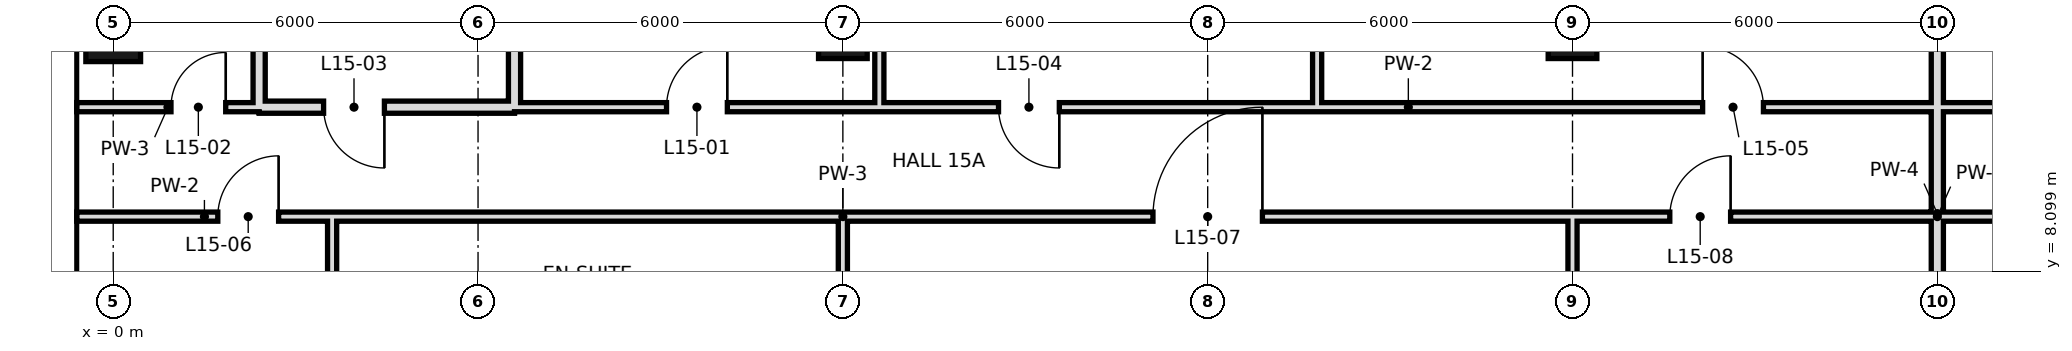
"""IFC4 building model, lengths in metres.
Left out: names, types, materials, properties, quantities, classifications, styles, units other than length and angle.
Written with IfcOpenShell. Run it as: python <this file> out.ifc"""

import sys

from ifc_helpers import new_model, si_unit, direction, frame, frame_2d, origin, origin_2d, place, context, subcontext, project, spatial, rectangle, hollow_rectangle, extrude, element, fill, save


model = new_model("IFC4")
c1 = context("Model", 3, precision=1e-05, world=origin(), true_north=direction((0.0, 1.0)))
c2 = subcontext(c1, "Body", "Model", "MODEL_VIEW")
j1 = project(units=[si_unit("LENGTHUNIT", "METRE"), si_unit("PLANEANGLEUNIT", "RADIAN")], contexts=[c1])
p1 = place(None, origin())
s1 = spatial("IfcSite", under=j1, at=p1, CompositionType="ELEMENT")
p2 = place(p1, origin())
s2 = spatial("IfcBuilding", under=s1, at=p2, CompositionType="ELEMENT")
p3 = place(p2, frame((0.0, 0.0, 75.0)))
s3 = spatial("IfcBuildingStorey", under=s2, at=p3, CompositionType="ELEMENT", Elevation=75.0)
p4 = place(p3, frame((0.0, 12.0, 0.0), z_axis=(0.0, 0.0, 1.0), x_axis=(1.0, 0.0, 0.0)))
e1 = element("IfcColumn", 1, at=p4, inside=s3, PredefinedType="COLUMN", context=c2, shape_type="SweptSolid", body=[
    extrude(hollow_rectangle(XDim=0.9, YDim=0.9, WallThickness=0.045, at=origin_2d()), origin(), (0.0, 0.0, 1.0), 3.6),
])
for number, where, z_axis, x_axis in (
    (2, (12.0, 12.0, 0.0), (0.0, 0.0, 1.0), (1.0, 0.0, 0.0)),
    (3, (24.0, 12.0, 0.0), (0.0, 0.0, 1.0), (1.0, 0.0, 0.0)),
):
    element("IfcColumn", number, at=place(p3, frame(where, z_axis=z_axis, x_axis=x_axis)), inside=s3, PredefinedType="COLUMN", context=c2, shape_type="SweptSolid", body=[
        extrude(hollow_rectangle(XDim=0.8, YDim=0.8, WallThickness=0.04, at=origin_2d()), origin(), (0.0, 0.0, 1.0), 3.6),
    ])
p5 = place(p3, frame((12.0, 6.0, 0.0), z_axis=(0.0, 0.0, 1.0), x_axis=(0.0, 1.0, 0.0)))
e4 = element("IfcWall", 4, at=p5, inside=s3, PredefinedType="PARTITIONING", context=c2, shape_type="SweptSolid", body=[
    extrude(rectangle(XDim=3.0, YDim=0.15, at=frame_2d((1.5, 0.0))), origin(), (0.0, 0.0, 1.0), 2.72),
])
for number, where, z_axis, x_axis in (
    (5, (12.6, 10.8, 0.0), (0.0, 0.0, 1.0), (0.0, 1.0, 0.0)),
    (6, (19.8, 10.8, 0.0), (0.0, 0.0, 1.0), (0.0, 1.0, 0.0)),
):
    element("IfcWall", number, at=place(p3, frame(where, z_axis=z_axis, x_axis=x_axis)), inside=s3, PredefinedType="PARTITIONING", context=c2, shape_type="SweptSolid", body=[
        extrude(rectangle(XDim=7.9, YDim=0.15, at=frame_2d((3.95, 0.0))), origin(), (0.0, 0.0, 1.0), 3.42),
    ])
p6 = place(p3, frame((2.4, 10.8, 0.0), z_axis=(0.0, 0.0, 1.0), x_axis=(0.0, 1.0, 0.0)))
e7 = element("IfcWall", 7, at=p6, inside=s3, PredefinedType="SOLIDWALL", context=c2, shape_type="SweptSolid", body=[
    extrude(rectangle(XDim=7.2, YDim=0.2, at=frame_2d((3.6, 0.0))), origin(), (0.0, 0.0, 1.0), 2.72),
])
p7 = place(p3, frame((24.0, 0.0, 0.0), z_axis=(0.0, 0.0, 1.0), x_axis=(0.0, 1.0, 0.0)))
e8 = element("IfcWall", 8, at=p7, inside=s3, PredefinedType="PARTITIONING", context=c2, shape_type="SweptSolid", body=[
    extrude(rectangle(XDim=9.0, YDim=0.15, at=frame_2d((4.5, 0.0))), origin(), (0.0, 0.0, 1.0), 2.72),
])
p8 = place(p3, frame((3.6, 6.0, 0.0), z_axis=(0.0, 0.0, 1.0), x_axis=(0.0, 1.0, 0.0)))
e9 = element("IfcWall", 9, at=p8, inside=s3, PredefinedType="PARTITIONING", context=c2, shape_type="SweptSolid", body=[
    extrude(rectangle(XDim=3.0, YDim=0.15, at=frame_2d((1.5, 0.0))), origin(), (0.0, 0.0, 1.0), 3.42),
])
p9 = place(p3, frame((30.0, -0.6, 0.0), z_axis=(0.0, 0.0, 1.0), x_axis=(0.0, 1.0, 0.0)))
e10 = element("IfcWall", 10, at=p9, inside=s3, PredefinedType="SOLIDWALL", context=c2, shape_type="SweptSolid", body=[
    extrude(rectangle(XDim=19.3, YDim=0.2, at=frame_2d((9.65, 0.0))), origin(), (0.0, 0.0, 1.0), 2.72),
])
p10 = place(p3, frame((6.6, 10.8, 0.0), z_axis=(0.0, 0.0, 1.0), x_axis=(0.0, 1.0, 0.0)))
e11 = element("IfcWall", 11, at=p10, inside=s3, PredefinedType="SOLIDWALL", context=c2, shape_type="SweptSolid", body=[
    extrude(rectangle(XDim=7.9, YDim=0.2, at=frame_2d((3.95, 0.0))), origin(), (0.0, 0.0, 1.0), 2.72),
])
p11 = place(p3, frame((2.4, 10.8, 0.0), z_axis=(0.0, 0.0, 1.0), x_axis=(1.0, 0.0, 0.0)))
e12 = element("IfcWall", 12, at=p11, inside=s3, PredefinedType="SOLIDWALL", context=c2, shape_type="SweptSolid", body=[
    extrude(rectangle(XDim=4.2, YDim=0.2, at=frame_2d((2.1, 0.0))), origin(), (0.0, 0.0, 1.0), 2.72),
])
p12 = place(p11, frame((1.06, 0.0, 0.0)))
e13 = element("IfcOpeningElement", 13, at=p12, cuts=e12, PredefinedType="OPENING", context=c2, shape_type="SweptSolid", body=[
    extrude(rectangle(XDim=1.0, YDim=2.4, at=frame_2d((0.5, 1.2))), frame((0.0, 0.11, 0.0), z_axis=(0.0, -1.0, 0.0), x_axis=(1.0, 0.0, 0.0)), (0.0, 0.0, 1.0), 0.22),
])
p13 = place(p3, frame((6.6, 10.8, 0.0), z_axis=(0.0, 0.0, 1.0), x_axis=(1.0, 0.0, 0.0)))
e14 = element("IfcWall", 14, at=p13, inside=s3, PredefinedType="PARTITIONING", context=c2, shape_type="SweptSolid", body=[
    extrude(rectangle(XDim=29.4, YDim=0.15, at=frame_2d((14.7, 0.0))), origin(), (0.0, 0.0, 1.0), 3.42),
])
p14 = place(p13, frame((2.5, 0.0, 0.0)))
e15 = element("IfcOpeningElement", 15, at=p14, cuts=e14, PredefinedType="OPENING", context=c2, shape_type="SweptSolid", body=[
    extrude(rectangle(XDim=1.0, YDim=2.4, at=frame_2d((0.5, 1.2))), frame((0.0, 0.085, 0.0), z_axis=(0.0, -1.0, 0.0), x_axis=(1.0, 0.0, 0.0)), (0.0, 0.0, 1.0), 0.17),
])
p15 = place(p13, frame((7.96, 0.0, 0.0)))
e16 = element("IfcOpeningElement", 16, at=p15, cuts=e14, PredefinedType="OPENING", context=c2, shape_type="SweptSolid", body=[
    extrude(rectangle(XDim=1.0, YDim=2.4, at=frame_2d((0.5, 1.2))), frame((0.0, 0.085, 0.0), z_axis=(0.0, -1.0, 0.0), x_axis=(1.0, 0.0, 0.0)), (0.0, 0.0, 1.0), 0.17),
])
p16 = place(p13, frame((19.54, 0.0, 0.0)))
e17 = element("IfcOpeningElement", 17, at=p16, cuts=e14, PredefinedType="OPENING", context=c2, shape_type="SweptSolid", body=[
    extrude(rectangle(XDim=1.0, YDim=2.4, at=frame_2d((0.5, 1.2))), frame((0.0, 0.085, 0.0), z_axis=(0.0, -1.0, 0.0), x_axis=(1.0, 0.0, 0.0)), (0.0, 0.0, 1.0), 0.17),
])
p17 = place(p13, frame((26.8, 0.0, 0.0)))
e18 = element("IfcOpeningElement", 18, at=p17, cuts=e14, PredefinedType="OPENING", context=c2, shape_type="SweptSolid", body=[
    extrude(rectangle(XDim=1.0, YDim=2.4, at=frame_2d((0.5, 1.2))), frame((0.0, 0.085, 0.0), z_axis=(0.0, -1.0, 0.0), x_axis=(1.0, 0.0, 0.0)), (0.0, 0.0, 1.0), 0.17),
])
p18 = place(p3, frame((-0.6, 10.8, 0.0), z_axis=(0.0, 0.0, 1.0), x_axis=(1.0, 0.0, 0.0)))
e19 = element("IfcWall", 19, at=p18, inside=s3, PredefinedType="PARTITIONING", context=c2, shape_type="SweptSolid", body=[
    extrude(rectangle(XDim=3.0, YDim=0.15, at=frame_2d((1.5, 0.0))), origin(), (0.0, 0.0, 1.0), 3.42),
])
p19 = place(p18, frame((1.55, 0.0, 0.0)))
e20 = element("IfcOpeningElement", 20, at=p19, cuts=e19, PredefinedType="OPENING", context=c2, shape_type="SweptSolid", body=[
    extrude(rectangle(XDim=0.9, YDim=2.4, at=frame_2d((0.45, 1.2))), frame((0.0, 0.085, 0.0), z_axis=(0.0, -1.0, 0.0), x_axis=(1.0, 0.0, 0.0)), (0.0, 0.0, 1.0), 0.17),
])
p20 = place(p3, frame((-0.6, 9.0, 0.0), z_axis=(0.0, 0.0, 1.0), x_axis=(1.0, 0.0, 0.0)))
e21 = element("IfcWall", 21, at=p20, inside=s3, PredefinedType="PARTITIONING", context=c2, shape_type="SweptSolid", body=[
    extrude(rectangle(XDim=4.2, YDim=0.15, at=frame_2d((2.1, 0.0))), origin(), (0.0, 0.0, 1.0), 3.42),
])
p21 = place(p20, frame((2.32, 0.0, 0.0)))
e22 = element("IfcOpeningElement", 22, at=p21, cuts=e21, PredefinedType="OPENING", context=c2, shape_type="SweptSolid", body=[
    extrude(rectangle(XDim=1.0, YDim=2.4, at=frame_2d((0.5, 1.2))), frame((0.0, 0.085, 0.0), z_axis=(0.0, -1.0, 0.0), x_axis=(1.0, 0.0, 0.0)), (0.0, 0.0, 1.0), 0.17),
])
p22 = place(p3, frame((12.0, 9.0, 0.0), z_axis=(0.0, 0.0, 1.0), x_axis=(1.0, 0.0, 0.0)))
e23 = element("IfcWall", 23, at=p22, inside=s3, PredefinedType="PARTITIONING", context=c2, shape_type="SweptSolid", body=[
    extrude(rectangle(XDim=36.0, YDim=0.15, at=frame_2d((18.0, 0.0))), origin(), (0.0, 0.0, 1.0), 3.42),
])
p23 = place(p22, frame((5.1, 0.0, 0.0)))
e24 = element("IfcOpeningElement", 24, at=p23, cuts=e23, PredefinedType="OPENING", context=c2, shape_type="SweptSolid", body=[
    extrude(rectangle(XDim=1.8, YDim=2.4, at=frame_2d((0.9, 1.2))), frame((0.0, 0.085, 0.0), z_axis=(0.0, -1.0, 0.0), x_axis=(1.0, 0.0, 0.0)), (0.0, 0.0, 1.0), 0.17),
])
p24 = place(p22, frame((13.6, 0.0, 0.0)))
e25 = element("IfcOpeningElement", 25, at=p24, cuts=e23, PredefinedType="OPENING", context=c2, shape_type="SweptSolid", body=[
    extrude(rectangle(XDim=1.0, YDim=2.4, at=frame_2d((0.5, 1.2))), frame((0.0, 0.085, 0.0), z_axis=(0.0, -1.0, 0.0), x_axis=(1.0, 0.0, 0.0)), (0.0, 0.0, 1.0), 0.17),
])
p25 = place(p22, frame((21.4, 0.0, 0.0)))
e26 = element("IfcOpeningElement", 26, at=p25, cuts=e23, PredefinedType="OPENING", context=c2, shape_type="SweptSolid", body=[
    extrude(rectangle(XDim=1.0, YDim=2.4, at=frame_2d((0.5, 1.2))), frame((0.0, 0.085, 0.0), z_axis=(0.0, -1.0, 0.0), x_axis=(1.0, 0.0, 0.0)), (0.0, 0.0, 1.0), 0.17),
])
p26 = place(p22, frame((25.6, 0.0, 0.0)))
e27 = element("IfcOpeningElement", 27, at=p26, cuts=e23, PredefinedType="OPENING", context=c2, shape_type="SweptSolid", body=[
    extrude(rectangle(XDim=1.0, YDim=2.4, at=frame_2d((0.5, 1.2))), frame((0.0, 0.085, 0.0), z_axis=(0.0, -1.0, 0.0), x_axis=(1.0, 0.0, 0.0)), (0.0, 0.0, 1.0), 0.17),
])
p27 = place(p22, frame((33.4, 0.0, 0.0)))
e28 = element("IfcOpeningElement", 28, at=p27, cuts=e23, PredefinedType="OPENING", context=c2, shape_type="SweptSolid", body=[
    extrude(rectangle(XDim=1.0, YDim=2.4, at=frame_2d((0.5, 1.2))), frame((0.0, 0.085, 0.0), z_axis=(0.0, -1.0, 0.0), x_axis=(1.0, 0.0, 0.0)), (0.0, 0.0, 1.0), 0.17),
])
p28 = place(p3, frame((3.6, 9.0, 0.0), z_axis=(0.0, 0.0, 1.0), x_axis=(1.0, 0.0, 0.0)))
e29 = element("IfcWall", 29, at=p28, inside=s3, PredefinedType="PARTITIONING", context=c2, shape_type="SweptSolid", body=[
    extrude(rectangle(XDim=8.4, YDim=0.15, at=frame_2d((4.2, 0.0))), origin(), (0.0, 0.0, 1.0), 3.42),
])
p29 = place(p14, frame((1.0, 0.0, 0.0), z_axis=(0.0, 0.0, 1.0), x_axis=(-1.0, 0.0, 0.0)))
e30 = element("IfcDoor", 30, at=p29, inside=s3, OperationType="SINGLE_SWING_LEFT", PredefinedType="DOOR", context=c2, shape_type="SweptSolid", body=[
    extrude(rectangle(XDim=1.0, YDim=2.4, at=frame_2d((0.5, 1.2))), frame((0.0, 0.025, 0.0), z_axis=(0.0, -1.0, 0.0), x_axis=(1.0, 0.0, 0.0)), (0.0, 0.0, 1.0), 0.05),
])
fill(e15, e30)
p30 = place(p19, frame((0.9, 0.0, 0.0), z_axis=(0.0, 0.0, 1.0), x_axis=(-1.0, 0.0, 0.0)))
e31 = element("IfcDoor", 31, at=p30, inside=s3, OperationType="SINGLE_SWING_LEFT", PredefinedType="DOOR", context=c2, shape_type="SweptSolid", body=[
    extrude(rectangle(XDim=0.9, YDim=2.4, at=frame_2d((0.45, 1.2))), frame((0.0, 0.025, 0.0), z_axis=(0.0, -1.0, 0.0), x_axis=(1.0, 0.0, 0.0)), (0.0, 0.0, 1.0), 0.05),
])
fill(e20, e31)
p31 = place(p12, origin())
e32 = element("IfcDoor", 32, at=p31, inside=s3, OperationType="SINGLE_SWING_RIGHT", PredefinedType="DOOR", context=c2, shape_type="SweptSolid", body=[
    extrude(rectangle(XDim=1.0, YDim=2.4, at=frame_2d((0.5, 1.2))), frame((0.0, 0.025, 0.0), z_axis=(0.0, -1.0, 0.0), x_axis=(1.0, 0.0, 0.0)), (0.0, 0.0, 1.0), 0.05),
])
fill(e13, e32)
p32 = place(p15, origin())
e33 = element("IfcDoor", 33, at=p32, inside=s3, OperationType="SINGLE_SWING_RIGHT", PredefinedType="DOOR", context=c2, shape_type="SweptSolid", body=[
    extrude(rectangle(XDim=1.0, YDim=2.4, at=frame_2d((0.5, 1.2))), frame((0.0, 0.025, 0.0), z_axis=(0.0, -1.0, 0.0), x_axis=(1.0, 0.0, 0.0)), (0.0, 0.0, 1.0), 0.05),
])
fill(e16, e33)
p33 = place(p16, origin())
e34 = element("IfcDoor", 34, at=p33, inside=s3, OperationType="SINGLE_SWING_LEFT", PredefinedType="DOOR", context=c2, shape_type="SweptSolid", body=[
    extrude(rectangle(XDim=1.0, YDim=2.4, at=frame_2d((0.5, 1.2))), frame((0.0, 0.025, 0.0), z_axis=(0.0, -1.0, 0.0), x_axis=(1.0, 0.0, 0.0)), (0.0, 0.0, 1.0), 0.05),
])
fill(e17, e34)
p34 = place(p21, frame((1.0, 0.0, 0.0), z_axis=(0.0, 0.0, 1.0), x_axis=(-1.0, 0.0, 0.0)))
e35 = element("IfcDoor", 35, at=p34, inside=s3, OperationType="SINGLE_SWING_LEFT", PredefinedType="DOOR", context=c2, shape_type="SweptSolid", body=[
    extrude(rectangle(XDim=1.0, YDim=2.4, at=frame_2d((0.5, 1.2))), frame((0.0, 0.025, 0.0), z_axis=(0.0, -1.0, 0.0), x_axis=(1.0, 0.0, 0.0)), (0.0, 0.0, 1.0), 0.05),
])
fill(e22, e35)
p35 = place(p23, frame((1.8, 0.0, 0.0), z_axis=(0.0, 0.0, 1.0), x_axis=(-1.0, 0.0, 0.0)))
e36 = element("IfcDoor", 36, at=p35, inside=s3, OperationType="SINGLE_SWING_LEFT", PredefinedType="DOOR", context=c2, shape_type="SweptSolid", body=[
    extrude(rectangle(XDim=1.8, YDim=2.4, at=frame_2d((0.9, 1.2))), frame((0.0, 0.025, 0.0), z_axis=(0.0, -1.0, 0.0), x_axis=(1.0, 0.0, 0.0)), (0.0, 0.0, 1.0), 0.05),
])
fill(e24, e36)
p36 = place(p24, frame((1.0, 0.0, 0.0), z_axis=(0.0, 0.0, 1.0), x_axis=(-1.0, 0.0, 0.0)))
e37 = element("IfcDoor", 37, at=p36, inside=s3, OperationType="SINGLE_SWING_LEFT", PredefinedType="DOOR", context=c2, shape_type="SweptSolid", body=[
    extrude(rectangle(XDim=1.0, YDim=2.4, at=frame_2d((0.5, 1.2))), frame((0.0, 0.025, 0.0), z_axis=(0.0, -1.0, 0.0), x_axis=(1.0, 0.0, 0.0)), (0.0, 0.0, 1.0), 0.05),
])
fill(e25, e37)
save(model, sys.argv[1])
